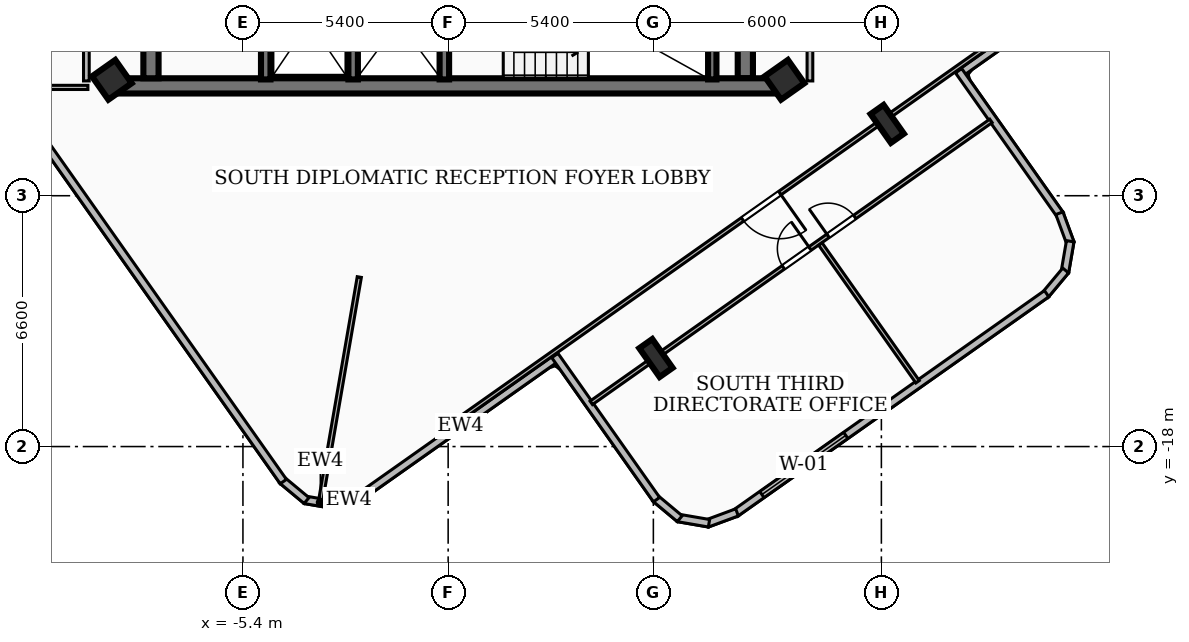
"""IFC4 building model, lengths in metres.
Left out: names, types, materials, properties, quantities, classifications, styles, units other than length and angle.
Written with IfcOpenShell. Run it as: python <this file> out.ifc"""

import sys

from ifc_helpers import new_model, si_unit, direction, frame, frame_2d, origin, origin_2d, place, context, subcontext, project, spatial, rectangle, i_section, extrude, element, fill, save


model = new_model("IFC4")
c1 = context("Model", 3, precision=1e-05, world=origin(), true_north=direction((0.0, 1.0)))
c2 = subcontext(c1, "Body", "Model", "MODEL_VIEW")
j1 = project(units=[si_unit("LENGTHUNIT", "METRE"), si_unit("PLANEANGLEUNIT", "RADIAN")], contexts=[c1])
p1 = place(None, origin())
s1 = spatial("IfcSite", under=j1, at=p1, CompositionType="ELEMENT")
p2 = place(p1, origin())
s2 = spatial("IfcBuilding", under=s1, at=p2, CompositionType="ELEMENT")
p3 = place(p2, frame((0.0, 0.0, 225.72)))
s3 = spatial("IfcBuildingStorey", under=s2, at=p3, CompositionType="ELEMENT", Elevation=225.72)
p4 = place(p3, frame((8.78, -8.51, 0.0), z_axis=(0.0, 0.0, 1.0), x_axis=(-1.0, 0.0, 0.0)))
e1 = element("IfcWall", 1, at=p4, inside=s3, PredefinedType="SHEAR", context=c2, shape_type="SweptSolid", body=[
    extrude(rectangle(XDim=17.56, YDim=0.4, at=frame_2d((8.78, 0.0))), origin(), (0.0, 0.0, 1.0), 3.14),
])
for number, where, z_axis, x_axis in (
    (2, (-7.82, -8.31, 0.0), (0.0, 0.0, 1.0), (0.0, 1.0, 0.0)),
    (3, (7.82, -1.95, 0.0), (0.0, 0.0, 1.0), (0.0, -1.0, 0.0)),
):
    element("IfcWall", number, at=place(p3, frame(where, z_axis=z_axis, x_axis=x_axis)), inside=s3, PredefinedType="SHEAR", context=c2, shape_type="SweptSolid", body=[
        extrude(rectangle(XDim=6.36, YDim=0.4, at=frame_2d((3.18, 0.0))), origin(), (0.0, 0.0, 1.0), 3.14),
    ])
p5 = place(p3, frame((6.95, -8.34, 0.0), z_axis=(0.0, 0.0, 1.0), x_axis=(0.0, 1.0, 0.0)))
e4 = element("IfcWall", 4, at=p5, inside=s3, PredefinedType="SOLIDWALL", context=c2, shape_type="SweptSolid", body=[
    extrude(rectangle(XDim=3.06, YDim=0.22, at=frame_2d((1.53, 0.0))), origin(), (0.0, 0.0, 1.0), 3.14),
])
for number, where, z_axis, x_axis in (
    (5, (-0.1, -8.34, 0.0), (0.0, 0.0, 1.0), (0.0, 1.0, 0.0)),
    (6, (-2.5, -8.34, 0.0), (0.0, 0.0, 1.0), (0.0, 1.0, 0.0)),
    (7, (-4.8, -8.34, 0.0), (0.0, 0.0, 1.0), (0.0, 1.0, 0.0)),
):
    element("IfcWall", number, at=place(p3, frame(where, z_axis=z_axis, x_axis=x_axis)), inside=s3, PredefinedType="SOLIDWALL", context=c2, shape_type="SweptSolid", body=[
        extrude(rectangle(XDim=3.04, YDim=0.25, at=frame_2d((1.52, 0.0))), origin(), (0.0, 0.0, 1.0), 3.14),
    ])
for number, where, z_axis, x_axis in (
    (8, (8.85, -8.35, 0.0), (0.0, 0.0, 1.0), (0.817, 0.576, 0.0)),
    (9, (-8.85, -8.35, 0.0), (0.0, 0.0, 1.0), (0.817, 0.576, 0.0)),
):
    element("IfcColumn", number, at=place(p3, frame(where, z_axis=z_axis, x_axis=x_axis)), inside=s3, PredefinedType="COLUMN", context=c2, shape_type="SweptSolid", body=[
        extrude(rectangle(XDim=0.75, YDim=0.75, at=origin_2d()), origin(), (0.0, 0.0, 1.0), 3.42),
    ])
for number, where, z_axis, x_axis in (
    (10, (5.468, -15.671, 0.0), (0.0, 0.0, 1.0), (0.817, 0.576, 0.0)),
    (11, (11.554, -9.51, 0.0), (0.0, 0.0, 1.0), (0.817, 0.576, 0.0)),
):
    element("IfcColumn", number, at=place(p3, frame(where, z_axis=z_axis, x_axis=x_axis)), inside=s3, PredefinedType="COLUMN", context=c2, shape_type="SweptSolid", body=[
        extrude(i_section(OverallWidth=0.418, OverallDepth=0.927, WebThickness=0.019, FlangeThickness=0.032, at=origin_2d()), origin(), (0.0, 0.0, 1.0), 3.42),
    ])
p6 = place(p3, frame((2.919, -15.623, 0.0), z_axis=(0.0, 0.0, 1.0), x_axis=(-0.817050016192, -0.576566796686, 0.0)))
e12 = element("IfcWall", 12, at=p6, inside=s3, PredefinedType="SOLIDWALL", context=c2, shape_type="SweptSolid", body=[
    extrude(rectangle(XDim=6.341, YDim=0.2, at=frame_2d((3.17, 0.0))), origin(), (0.0, 0.0, 1.0), 3.14),
])
p7 = place(p3, frame((-2.219, -19.256, 0.0), z_axis=(0.0, 0.0, 1.0), x_axis=(-0.938243551417, -0.345975487894, 0.0)))
e13 = element("IfcWall", 13, at=p7, inside=s3, PredefinedType="SOLIDWALL", context=c2, shape_type="SweptSolid", body=[
    extrude(rectangle(XDim=0.838, YDim=0.2, at=frame_2d((0.419, 0.0))), origin(), (0.0, 0.0, 1.0), 3.14),
])
p8 = place(p3, frame((-2.957, -19.541, 0.0), z_axis=(0.0, 0.0, 1.0), x_axis=(-0.985466949497, 0.169867275979, 0.0)))
e14 = element("IfcWall", 14, at=p8, inside=s3, PredefinedType="SOLIDWALL", context=c2, shape_type="SweptSolid", body=[
    extrude(rectangle(XDim=0.825, YDim=0.2, at=frame_2d((0.413, 0.0))), origin(), (0.0, 0.0, 1.0), 3.14),
])
p9 = place(p3, frame((-3.726, -19.421, 0.0), z_axis=(0.0, 0.0, 1.0), x_axis=(-0.768698761673, 0.639610986305, 0.0)))
e15 = element("IfcWall", 15, at=p9, inside=s3, PredefinedType="SOLIDWALL", context=c2, shape_type="SweptSolid", body=[
    extrude(rectangle(XDim=0.838, YDim=0.2, at=frame_2d((0.419, 0.0))), origin(), (0.0, 0.0, 1.0), 3.14),
])
p10 = place(p3, frame((-4.337, -18.921, 0.0), z_axis=(0.0, 0.0, 1.0), x_axis=(-0.576413609547, 0.817158094085, 0.0)))
e16 = element("IfcWall", 16, at=p10, inside=s3, PredefinedType="SOLIDWALL", context=c2, shape_type="SweptSolid", body=[
    extrude(rectangle(XDim=25.923, YDim=0.2, at=frame_2d((12.961, 0.0))), origin(), (0.0, 0.0, 1.0), 3.14),
])
p11 = place(p10, frame((19.02, 0.0, 0.85)))
e17 = element("IfcOpeningElement", 17, at=p11, cuts=e16, PredefinedType="OPENING", context=c2, shape_type="SweptSolid", body=[
    extrude(rectangle(XDim=2.4, YDim=1.65, at=frame_2d((1.2, 0.825))), frame((0.0, 0.11, 0.0), z_axis=(0.0, -1.0, 0.0), x_axis=(1.0, 0.0, 0.0)), (0.0, 0.0, 1.0), 0.22),
])
p12 = place(p3, frame((18.921, -4.337, 0.0), z_axis=(0.0, 0.0, 1.0), x_axis=(-0.817167578816, -0.576400163196, 0.0)))
e18 = element("IfcWall", 18, at=p12, inside=s3, PredefinedType="SOLIDWALL", context=c2, shape_type="SweptSolid", body=[
    extrude(rectangle(XDim=6.74, YDim=0.2, at=frame_2d((3.37, 0.0))), origin(), (0.0, 0.0, 1.0), 3.14),
])
p13 = place(p3, frame((13.432, -8.111, 0.0), z_axis=(0.0, 0.0, 1.0), x_axis=(0.576445639344, -0.817135499707, 0.0)))
e19 = element("IfcWall", 19, at=p13, inside=s3, PredefinedType="SOLIDWALL", context=c2, shape_type="SweptSolid", body=[
    extrude(rectangle(XDim=4.641, YDim=0.2, at=frame_2d((2.32, 0.0))), origin(), (0.0, 0.0, 1.0), 3.14),
])
p14 = place(p3, frame((16.084, -11.86, 0.0), z_axis=(0.0, 0.0, 1.0), x_axis=(0.346232030844, -0.938148911857, 0.0)))
e20 = element("IfcWall", 20, at=p14, inside=s3, PredefinedType="SOLIDWALL", context=c2, shape_type="SweptSolid", body=[
    extrude(rectangle(XDim=0.838, YDim=0.2, at=frame_2d((0.419, 0.0))), origin(), (0.0, 0.0, 1.0), 3.14),
])
p15 = place(p3, frame((16.369, -12.598, 0.0), z_axis=(0.0, 0.0, 1.0), x_axis=(-0.169332910212, -0.985558910223, 0.0)))
e21 = element("IfcWall", 21, at=p15, inside=s3, PredefinedType="SOLIDWALL", context=c2, shape_type="SweptSolid", body=[
    extrude(rectangle(XDim=0.826, YDim=0.2, at=frame_2d((0.413, 0.0))), origin(), (0.0, 0.0, 1.0), 3.14),
])
p16 = place(p3, frame((16.249, -13.368, 0.0), z_axis=(0.0, 0.0, 1.0), x_axis=(-0.641043819012, -0.76750428149, 0.0)))
e22 = element("IfcWall", 22, at=p16, inside=s3, PredefinedType="SOLIDWALL", context=c2, shape_type="SweptSolid", body=[
    extrude(rectangle(XDim=0.838, YDim=0.2, at=frame_2d((0.419, 0.0))), origin(), (0.0, 0.0, 1.0), 3.14),
])
p17 = place(p3, frame((15.748, -13.978, 0.0), z_axis=(0.0, 0.0, 1.0), x_axis=(-0.817168991675, -0.576398160168, 0.0)))
e23 = element("IfcWall", 23, at=p17, inside=s3, PredefinedType="SOLIDWALL", context=c2, shape_type="SweptSolid", body=[
    extrude(rectangle(XDim=10.022, YDim=0.2, at=frame_2d((5.011, 0.0))), origin(), (0.0, 0.0, 1.0), 3.14),
])
p18 = place(p17, frame((6.468, 0.0, 0.85)))
e24 = element("IfcOpeningElement", 24, at=p18, cuts=e23, PredefinedType="OPENING", context=c2, shape_type="SweptSolid", body=[
    extrude(rectangle(XDim=2.7, YDim=2.1, at=frame_2d((1.35, 1.05))), frame((0.0, 0.11, 0.0), z_axis=(0.0, -1.0, 0.0), x_axis=(1.0, 0.0, 0.0)), (0.0, 0.0, 1.0), 0.22),
])
p19 = place(p3, frame((7.601, -19.732, 0.0), z_axis=(0.0, 0.0, 1.0), x_axis=(-0.937664324164, -0.347542249504, 0.0)))
e25 = element("IfcWall", 25, at=p19, inside=s3, PredefinedType="SOLIDWALL", context=c2, shape_type="SweptSolid", body=[
    extrude(rectangle(XDim=0.837, YDim=0.2, at=frame_2d((0.419, 0.0))), origin(), (0.0, 0.0, 1.0), 3.14),
])
p20 = place(p3, frame((6.864, -20.018, 0.0), z_axis=(0.0, 0.0, 1.0), x_axis=(-0.985501046628, 0.16966934636, 0.0)))
e26 = element("IfcWall", 26, at=p20, inside=s3, PredefinedType="SOLIDWALL", context=c2, shape_type="SweptSolid", body=[
    extrude(rectangle(XDim=0.826, YDim=0.2, at=frame_2d((0.413, 0.0))), origin(), (0.0, 0.0, 1.0), 3.14),
])
p21 = place(p3, frame((6.094, -19.898, 0.0), z_axis=(0.0, 0.0, 1.0), x_axis=(-0.767647650908, 0.640872127694, 0.0)))
e27 = element("IfcWall", 27, at=p21, inside=s3, PredefinedType="SOLIDWALL", context=c2, shape_type="SweptSolid", body=[
    extrude(rectangle(XDim=0.838, YDim=0.2, at=frame_2d((0.419, 0.0))), origin(), (0.0, 0.0, 1.0), 3.14),
])
p22 = place(p3, frame((5.484, -19.397, 0.0), z_axis=(0.0, 0.0, 1.0), x_axis=(-0.576451897958, 0.817131084551, 0.0)))
e28 = element("IfcWall", 28, at=p22, inside=s3, PredefinedType="SOLIDWALL", context=c2, shape_type="SweptSolid", body=[
    extrude(rectangle(XDim=4.642, YDim=0.2, at=frame_2d((2.321, 0.0))), origin(), (0.0, 0.0, 1.0), 3.14),
])
for number, where, z_axis, x_axis in (
    (29, (-9.52, -8.38, 0.0), (0.0, 0.0, 1.0), (0.0, 1.0, 0.0)),
    (30, (9.52, -8.38, 0.0), (0.0, 0.0, 1.0), (0.0, 1.0, 0.0)),
):
    element("IfcWall", number, at=place(p3, frame(where, z_axis=z_axis, x_axis=x_axis)), inside=s3, PredefinedType="PARTITIONING", context=c2, shape_type="SweptSolid", body=[
        extrude(rectangle(XDim=6.63, YDim=0.15, at=frame_2d((3.315, 0.0))), origin(), (0.0, 0.0, 1.0), 3.14),
    ])
p23 = place(p3, frame((-11.573, -8.55, 0.0), z_axis=(0.0, 0.0, 1.0), x_axis=(1.0, 0.0, 0.0)))
e31 = element("IfcWall", 31, at=p23, inside=s3, PredefinedType="PARTITIONING", context=c2, shape_type="SweptSolid", body=[
    extrude(rectangle(XDim=2.093, YDim=0.11, at=frame_2d((1.046, 0.0))), origin(), (0.0, 0.0, 1.0), 3.14),
])
p24 = place(p3, frame((-2.338, -13.54, 0.0), z_axis=(0.0, 0.0, 1.0), x_axis=(-0.1703339471, -0.9853863945, 0.0)))
e32 = element("IfcWall", 32, at=p24, inside=s3, PredefinedType="PARTITIONING", context=c2, shape_type="SweptSolid", body=[
    extrude(rectangle(XDim=5.954, YDim=0.11, at=frame_2d((2.977, 0.0))), origin(), (0.0, 0.0, 1.0), 3.14),
])
p25 = place(p3, frame((16.752, -5.671, 0.0), z_axis=(0.0, 0.0, 1.0), x_axis=(-0.81715881447, -0.576412588285, 0.0)))
e33 = element("IfcWall", 33, at=p25, inside=s3, PredefinedType="PARTITIONING", context=c2, shape_type="SweptSolid", body=[
    extrude(rectangle(XDim=20.44, YDim=0.11, at=frame_2d((10.22, 0.0))), origin(), (0.0, 0.0, 1.0), 2.51),
])
p26 = place(p25, frame((9.82, 0.0, 0.0)))
e34 = element("IfcOpeningElement", 34, at=p26, cuts=e33, PredefinedType="OPENING", context=c2, shape_type="SweptSolid", body=[
    extrude(rectangle(XDim=1.2, YDim=2.1, at=frame_2d((0.6, 1.05))), frame((0.0, 0.065, 0.0), z_axis=(0.0, -1.0, 0.0), x_axis=(1.0, 0.0, 0.0)), (0.0, 0.0, 1.0), 0.13),
])
p27 = place(p3, frame((9.795, -12.671, 0.0), z_axis=(0.0, 0.0, 1.0), x_axis=(0.576531911777, -0.817074632272, 0.0)))
e35 = element("IfcWall", 35, at=p27, inside=s3, PredefinedType="PARTITIONING", context=c2, shape_type="SweptSolid", body=[
    extrude(rectangle(XDim=4.435, YDim=0.11, at=frame_2d((2.218, 0.0))), origin(), (0.0, 0.0, 1.0), 3.14),
])
p28 = place(p3, frame((3.766, -16.85, 0.0), z_axis=(0.0, 0.0, 1.0), x_axis=(0.817131323803, 0.576451558815, 0.0)))
e36 = element("IfcWall", 36, at=p28, inside=s3, PredefinedType="PARTITIONING", context=c2, shape_type="SweptSolid", body=[
    extrude(rectangle(XDim=12.87, YDim=0.11, at=frame_2d((6.435, 0.0))), origin(), (0.0, 0.0, 1.0), 2.51),
])
p29 = place(p28, frame((6.185, 0.0, 0.0)))
e37 = element("IfcOpeningElement", 37, at=p29, cuts=e36, PredefinedType="OPENING", context=c2, shape_type="SweptSolid", body=[
    extrude(rectangle(XDim=0.86, YDim=2.04, at=frame_2d((0.43, 1.02))), frame((0.0, 0.065, 0.0), z_axis=(0.0, -1.0, 0.0), x_axis=(1.0, 0.0, 0.0)), (0.0, 0.0, 1.0), 0.13),
])
p30 = place(p28, frame((7.625, 0.0, 0.0)))
e38 = element("IfcOpeningElement", 38, at=p30, cuts=e36, PredefinedType="OPENING", context=c2, shape_type="SweptSolid", body=[
    extrude(rectangle(XDim=0.86, YDim=2.04, at=frame_2d((0.43, 1.02))), frame((0.0, 0.065, 0.0), z_axis=(0.0, -1.0, 0.0), x_axis=(1.0, 0.0, 0.0)), (0.0, 0.0, 1.0), 0.13),
])
p31 = place(p18, origin())
e39 = element("IfcWindow", 39, at=p31, inside=s3, PartitioningType="SINGLE_PANEL", PredefinedType="WINDOW", context=c2, shape_type="SweptSolid", body=[
    extrude(rectangle(XDim=2.7, YDim=2.1, at=frame_2d((1.35, 1.05))), frame((0.0, 0.03, 0.0), z_axis=(0.0, -1.0, 0.0), x_axis=(1.0, 0.0, 0.0)), (0.0, 0.0, 1.0), 0.06),
])
fill(e24, e39)
p32 = place(p26, origin())
e40 = element("IfcDoor", 40, at=p32, inside=s3, OperationType="SINGLE_SWING_LEFT", PredefinedType="DOOR", context=c2, shape_type="SweptSolid", body=[
    extrude(rectangle(XDim=1.2, YDim=2.1, at=frame_2d((0.6, 1.05))), frame((0.0, 0.025, 0.0), z_axis=(0.0, -1.0, 0.0), x_axis=(1.0, 0.0, 0.0)), (0.0, 0.0, 1.0), 0.05),
])
fill(e34, e40)
p33 = place(p29, origin())
e41 = element("IfcDoor", 41, at=p33, inside=s3, OperationType="SINGLE_SWING_RIGHT", PredefinedType="DOOR", context=c2, shape_type="SweptSolid", body=[
    extrude(rectangle(XDim=0.86, YDim=2.04, at=frame_2d((0.43, 1.02))), frame((0.0, 0.025, 0.0), z_axis=(0.0, -1.0, 0.0), x_axis=(1.0, 0.0, 0.0)), (0.0, 0.0, 1.0), 0.05),
])
fill(e37, e41)
p34 = place(p30, origin())
e42 = element("IfcDoor", 42, at=p34, inside=s3, OperationType="SINGLE_SWING_LEFT", PredefinedType="DOOR", context=c2, shape_type="SweptSolid", body=[
    extrude(rectangle(XDim=0.86, YDim=2.04, at=frame_2d((0.43, 1.02))), frame((0.0, 0.025, 0.0), z_axis=(0.0, -1.0, 0.0), x_axis=(1.0, 0.0, 0.0)), (0.0, 0.0, 1.0), 0.05),
])
fill(e38, e42)
save(model, sys.argv[1])
